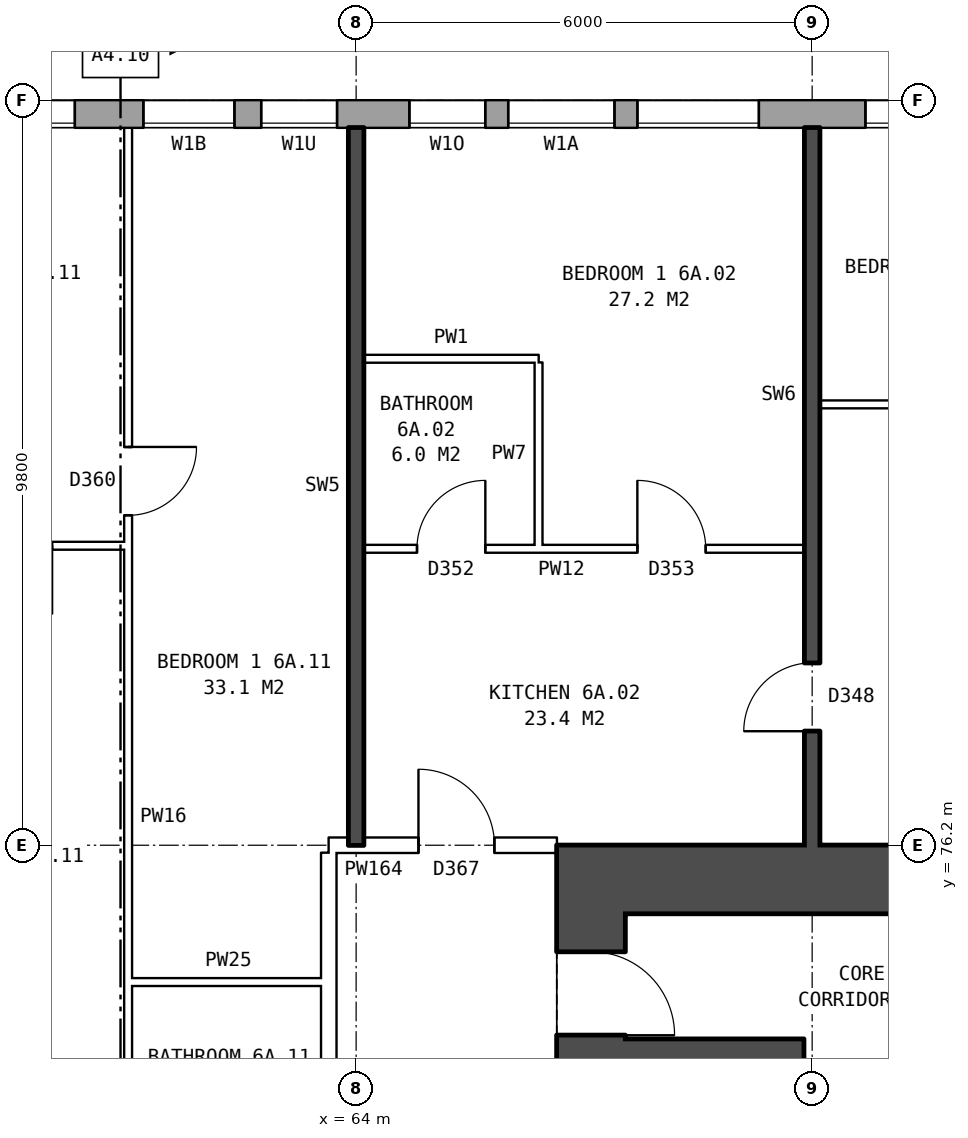
"""IFC4 building model, lengths in metres.
Left out: names, types, materials, properties, quantities, classifications, styles, units other than length and angle.
Written with IfcOpenShell. Run it as: python <this file> out.ifc"""

import sys

from ifc_helpers import new_model, si_unit, direction, frame, frame_2d, origin, place, context, subcontext, project, spatial, rectangle, extrude, element, fill, save


model = new_model("IFC4")
c1 = context("Model", 3, precision=1e-05, world=origin(), true_north=direction((0.0, 1.0)))
c2 = subcontext(c1, "Body", "Model", "MODEL_VIEW")
j1 = project(units=[si_unit("LENGTHUNIT", "METRE"), si_unit("PLANEANGLEUNIT", "RADIAN")], contexts=[c1])
p1 = place(None, origin())
s1 = spatial("IfcSite", under=j1, at=p1, CompositionType="ELEMENT")
p2 = place(p1, origin())
s2 = spatial("IfcBuilding", under=s1, at=p2, CompositionType="ELEMENT")
p3 = place(p2, frame((0.0, 0.0, 25.7)))
s3 = spatial("IfcBuildingStorey", under=s2, at=p3, CompositionType="ELEMENT", Elevation=25.7)
p4 = place(p3, frame((72.925, 85.82, 0.0), z_axis=(0.0, 0.0, 1.0), x_axis=(-1.0, 0.0, 0.0)))
e1 = element("IfcWall", 1, at=p4, inside=s3, PredefinedType="STANDARD", context=c2, shape_type="SweptSolid", body=[
    extrude(rectangle(XDim=50.101, YDim=0.36, at=frame_2d((25.05, 0.0))), origin(), (0.0, 0.0, 1.0), 2.85),
])
p5 = place(p4, frame((0.625, 0.0, 0.8)))
e2 = element("IfcOpeningElement", 2, at=p5, cuts=e1, PredefinedType="OPENING", context=c2, shape_type="SweptSolid", body=[
    extrude(rectangle(XDim=1.6, YDim=1.8, at=frame_2d((0.8, 0.9))), frame((0.0, 0.19, 0.0), z_axis=(0.0, -1.0, 0.0), x_axis=(1.0, 0.0, 0.0)), (0.0, 0.0, 1.0), 0.38),
])
p6 = place(p4, frame((3.625, 0.0, 0.8)))
e3 = element("IfcOpeningElement", 3, at=p6, cuts=e1, PredefinedType="OPENING", context=c2, shape_type="SweptSolid", body=[
    extrude(rectangle(XDim=1.6, YDim=1.8, at=frame_2d((0.8, 0.9))), frame((0.0, 0.19, 0.0), z_axis=(0.0, -1.0, 0.0), x_axis=(1.0, 0.0, 0.0)), (0.0, 0.0, 1.0), 0.38),
])
p7 = place(p4, frame((5.525, 0.0, 0.8)))
e4 = element("IfcOpeningElement", 4, at=p7, cuts=e1, PredefinedType="OPENING", context=c2, shape_type="SweptSolid", body=[
    extrude(rectangle(XDim=1.4, YDim=1.8, at=frame_2d((0.7, 0.9))), frame((0.0, 0.19, 0.0), z_axis=(0.0, -1.0, 0.0), x_axis=(1.0, 0.0, 0.0)), (0.0, 0.0, 1.0), 0.38),
])
p8 = place(p4, frame((9.175, 0.0, 0.15)))
e5 = element("IfcOpeningElement", 5, at=p8, cuts=e1, PredefinedType="OPENING", context=c2, shape_type="SweptSolid", body=[
    extrude(rectangle(XDim=1.0, YDim=0.9, at=frame_2d((0.5, 0.45))), frame((0.0, 0.19, 0.0), z_axis=(0.0, -1.0, 0.0), x_axis=(1.0, 0.0, 0.0)), (0.0, 0.0, 1.0), 0.38),
])
p9 = place(p4, frame((12.625, 0.0, 0.8)))
e6 = element("IfcOpeningElement", 6, at=p9, cuts=e1, PredefinedType="OPENING", context=c2, shape_type="SweptSolid", body=[
    extrude(rectangle(XDim=1.6, YDim=1.8, at=frame_2d((0.8, 0.9))), frame((0.0, 0.19, 0.0), z_axis=(0.0, -1.0, 0.0), x_axis=(1.0, 0.0, 0.0)), (0.0, 0.0, 1.0), 0.38),
])
p10 = place(p4, frame((15.625, 0.0, 0.8)))
e7 = element("IfcOpeningElement", 7, at=p10, cuts=e1, PredefinedType="OPENING", context=c2, shape_type="SweptSolid", body=[
    extrude(rectangle(XDim=1.6, YDim=1.8, at=frame_2d((0.8, 0.9))), frame((0.0, 0.19, 0.0), z_axis=(0.0, -1.0, 0.0), x_axis=(1.0, 0.0, 0.0)), (0.0, 0.0, 1.0), 0.38),
])
p11 = place(p4, frame((18.625, 0.0, 0.8)))
e8 = element("IfcOpeningElement", 8, at=p11, cuts=e1, PredefinedType="OPENING", context=c2, shape_type="SweptSolid", body=[
    extrude(rectangle(XDim=1.6, YDim=1.8, at=frame_2d((0.8, 0.9))), frame((0.0, 0.19, 0.0), z_axis=(0.0, -1.0, 0.0), x_axis=(1.0, 0.0, 0.0)), (0.0, 0.0, 1.0), 0.38),
])
p12 = place(p4, frame((21.625, 0.0, 0.8)))
e9 = element("IfcOpeningElement", 9, at=p12, cuts=e1, PredefinedType="OPENING", context=c2, shape_type="SweptSolid", body=[
    extrude(rectangle(XDim=1.6, YDim=1.8, at=frame_2d((0.8, 0.9))), frame((0.0, 0.19, 0.0), z_axis=(0.0, -1.0, 0.0), x_axis=(1.0, 0.0, 0.0)), (0.0, 0.0, 1.0), 0.38),
])
p13 = place(p4, frame((24.625, 0.0, 0.8)))
e10 = element("IfcOpeningElement", 10, at=p13, cuts=e1, PredefinedType="OPENING", context=c2, shape_type="SweptSolid", body=[
    extrude(rectangle(XDim=1.6, YDim=1.8, at=frame_2d((0.8, 0.9))), frame((0.0, 0.19, 0.0), z_axis=(0.0, -1.0, 0.0), x_axis=(1.0, 0.0, 0.0)), (0.0, 0.0, 1.0), 0.38),
])
p14 = place(p4, frame((27.625, 0.0, 0.8)))
e11 = element("IfcOpeningElement", 11, at=p14, cuts=e1, PredefinedType="OPENING", context=c2, shape_type="SweptSolid", body=[
    extrude(rectangle(XDim=1.6, YDim=1.8, at=frame_2d((0.8, 0.9))), frame((0.0, 0.19, 0.0), z_axis=(0.0, -1.0, 0.0), x_axis=(1.0, 0.0, 0.0)), (0.0, 0.0, 1.0), 0.38),
])
p15 = place(p4, frame((30.625, 0.0, 0.8)))
e12 = element("IfcOpeningElement", 12, at=p15, cuts=e1, PredefinedType="OPENING", context=c2, shape_type="SweptSolid", body=[
    extrude(rectangle(XDim=1.6, YDim=1.8, at=frame_2d((0.8, 0.9))), frame((0.0, 0.19, 0.0), z_axis=(0.0, -1.0, 0.0), x_axis=(1.0, 0.0, 0.0)), (0.0, 0.0, 1.0), 0.38),
])
p16 = place(p4, frame((33.625, 0.0, 0.8)))
e13 = element("IfcOpeningElement", 13, at=p16, cuts=e1, PredefinedType="OPENING", context=c2, shape_type="SweptSolid", body=[
    extrude(rectangle(XDim=1.6, YDim=1.8, at=frame_2d((0.8, 0.9))), frame((0.0, 0.19, 0.0), z_axis=(0.0, -1.0, 0.0), x_axis=(1.0, 0.0, 0.0)), (0.0, 0.0, 1.0), 0.38),
])
p17 = place(p4, frame((36.625, 0.0, 0.8)))
e14 = element("IfcOpeningElement", 14, at=p17, cuts=e1, PredefinedType="OPENING", context=c2, shape_type="SweptSolid", body=[
    extrude(rectangle(XDim=1.6, YDim=1.8, at=frame_2d((0.8, 0.9))), frame((0.0, 0.19, 0.0), z_axis=(0.0, -1.0, 0.0), x_axis=(1.0, 0.0, 0.0)), (0.0, 0.0, 1.0), 0.38),
])
p18 = place(p4, frame((39.125, 0.0, 0.8)))
e15 = element("IfcOpeningElement", 15, at=p18, cuts=e1, PredefinedType="OPENING", context=c2, shape_type="SweptSolid", body=[
    extrude(rectangle(XDim=0.8, YDim=0.9, at=frame_2d((0.4, 0.45))), frame((0.0, 0.19, 0.0), z_axis=(0.0, -1.0, 0.0), x_axis=(1.0, 0.0, 0.0)), (0.0, 0.0, 1.0), 0.38),
])
p19 = place(p4, frame((42.625, 0.0, 0.8)))
e16 = element("IfcOpeningElement", 16, at=p19, cuts=e1, PredefinedType="OPENING", context=c2, shape_type="SweptSolid", body=[
    extrude(rectangle(XDim=1.6, YDim=1.8, at=frame_2d((0.8, 0.9))), frame((0.0, 0.19, 0.0), z_axis=(0.0, -1.0, 0.0), x_axis=(1.0, 0.0, 0.0)), (0.0, 0.0, 1.0), 0.38),
])
p20 = place(p4, frame((45.625, 0.0, 0.8)))
e17 = element("IfcOpeningElement", 17, at=p20, cuts=e1, PredefinedType="OPENING", context=c2, shape_type="SweptSolid", body=[
    extrude(rectangle(XDim=1.6, YDim=1.8, at=frame_2d((0.8, 0.9))), frame((0.0, 0.19, 0.0), z_axis=(0.0, -1.0, 0.0), x_axis=(1.0, 0.0, 0.0)), (0.0, 0.0, 1.0), 0.38),
])
p21 = place(p4, frame((7.225, 0.0, 1.4)))
e18 = element("IfcOpeningElement", 18, at=p21, cuts=e1, PredefinedType="OPENING", context=c2, shape_type="SweptSolid", body=[
    extrude(rectangle(XDim=1.0, YDim=1.2, at=frame_2d((0.5, 0.6))), frame((0.0, 0.19, 0.0), z_axis=(0.0, -1.0, 0.0), x_axis=(1.0, 0.0, 0.0)), (0.0, 0.0, 1.0), 0.38),
])
p22 = place(p4, frame((10.525, 0.0, 0.15)))
e19 = element("IfcOpeningElement", 19, at=p22, cuts=e1, PredefinedType="OPENING", context=c2, shape_type="SweptSolid", body=[
    extrude(rectangle(XDim=1.2, YDim=1.8, at=frame_2d((0.6, 0.9))), frame((0.0, 0.19, 0.0), z_axis=(0.0, -1.0, 0.0), x_axis=(1.0, 0.0, 0.0)), (0.0, 0.0, 1.0), 0.38),
])
p23 = place(p4, frame((41.375, 0.0, 1.7)))
e20 = element("IfcOpeningElement", 20, at=p23, cuts=e1, PredefinedType="OPENING", context=c2, shape_type="SweptSolid", body=[
    extrude(rectangle(XDim=0.8, YDim=0.9, at=frame_2d((0.4, 0.45))), frame((0.0, 0.19, 0.0), z_axis=(0.0, -1.0, 0.0), x_axis=(1.0, 0.0, 0.0)), (0.0, 0.0, 1.0), 0.38),
])
p24 = place(p3, frame((67.09, 64.7, 0.0), z_axis=(0.0, 0.0, 1.0), x_axis=(0.0, 1.0, 0.0)))
e21 = element("IfcWall", 21, at=p24, inside=s3, PredefinedType="SHEAR", context=c2, shape_type="SweptSolid", body=[
    extrude(rectangle(XDim=10.6, YDim=0.9, at=frame_2d((5.3, 0.0))), origin(), (0.0, 0.0, 1.0), 2.85),
])
p25 = place(p24, frame((0.425, 0.0, 0.0)))
e22 = element("IfcOpeningElement", 22, at=p25, cuts=e21, PredefinedType="OPENING", context=c2, shape_type="SweptSolid", body=[
    extrude(rectangle(XDim=1.1, YDim=2.1, at=frame_2d((0.55, 1.05))), frame((0.0, 0.46, 0.0), z_axis=(0.0, -1.0, 0.0), x_axis=(1.0, 0.0, 0.0)), (0.0, 0.0, 1.0), 0.92),
])
p26 = place(p24, frame((9.0, 0.0, 0.0)))
e23 = element("IfcOpeningElement", 23, at=p26, cuts=e21, PredefinedType="OPENING", context=c2, shape_type="SweptSolid", body=[
    extrude(rectangle(XDim=1.1, YDim=2.1, at=frame_2d((0.55, 1.05))), frame((0.0, 0.46, 0.0), z_axis=(0.0, -1.0, 0.0), x_axis=(1.0, 0.0, 0.0)), (0.0, 0.0, 1.0), 0.92),
])
p27 = place(p3, frame((66.64, 75.75, 0.0), z_axis=(0.0, 0.0, 1.0), x_axis=(1.0, 0.0, 0.0)))
e24 = element("IfcWall", 24, at=p27, inside=s3, PredefinedType="SHEAR", context=c2, shape_type="SweptSolid", body=[
    extrude(rectangle(XDim=9.0, YDim=0.9, at=frame_2d((4.5, 0.0))), origin(), (0.0, 0.0, 1.0), 2.85),
])
p28 = place(p3, frame((67.54, 73.45, 0.0), z_axis=(0.0, 0.0, 1.0), x_axis=(1.0, 0.0, 0.0)))
e25 = element("IfcWall", 25, at=p28, inside=s3, PredefinedType="SHEAR", context=c2, shape_type="SweptSolid", body=[
    extrude(rectangle(XDim=1.95, YDim=0.4, at=frame_2d((0.975, 0.0))), origin(), (0.0, 0.0, 1.0), 2.85),
])
p29 = place(p3, frame((69.69, 67.05, 0.0), z_axis=(0.0, 0.0, 1.0), x_axis=(0.0, 1.0, 0.0)))
e26 = element("IfcWall", 26, at=p29, inside=s3, PredefinedType="SHEAR", context=c2, shape_type="SweptSolid", body=[
    extrude(rectangle(XDim=6.6, YDim=0.4, at=frame_2d((3.3, 0.0))), origin(), (0.0, 0.0, 1.0), 2.85),
])
p30 = place(p3, frame((63.64, 63.9, 0.0), z_axis=(0.0, 0.0, 1.0), x_axis=(0.0, 1.0, 0.0)))
e27 = element("IfcWall", 27, at=p30, inside=s3, PredefinedType="PARTITIONING", context=c2, shape_type="SweptSolid", body=[
    extrude(rectangle(XDim=12.2, YDim=0.2, at=frame_2d((6.1, 0.0))), origin(), (0.0, 0.0, 1.0), 2.85),
])
p31 = place(p30, frame((5.1, 0.0, 0.0)))
e28 = element("IfcOpeningElement", 28, at=p31, cuts=e27, PredefinedType="OPENING", context=c2, shape_type="SweptSolid", body=[
    extrude(rectangle(XDim=2.0, YDim=2.1, at=frame_2d((1.0, 1.05))), frame((0.0, 0.11, 0.0), z_axis=(0.0, -1.0, 0.0), x_axis=(1.0, 0.0, 0.0)), (0.0, 0.0, 1.0), 0.22),
])
p32 = place(p3, frame((61.0, 74.4, 0.0), z_axis=(0.0, 0.0, 1.0), x_axis=(1.0, 0.0, 0.0)))
e29 = element("IfcWall", 29, at=p32, inside=s3, PredefinedType="PARTITIONING", context=c2, shape_type="SweptSolid", body=[
    extrude(rectangle(XDim=2.64, YDim=0.1, at=frame_2d((1.32, 0.0))), origin(), (0.0, 0.0, 1.0), 2.85),
])
p33 = place(p3, frame((63.64, 76.2, 0.0), z_axis=(0.0, 0.0, 1.0), x_axis=(1.0, 0.0, 0.0)))
e30 = element("IfcWall", 30, at=p33, inside=s3, PredefinedType="PARTITIONING", context=c2, shape_type="SweptSolid", body=[
    extrude(rectangle(XDim=3.0, YDim=0.2, at=frame_2d((1.5, 0.0))), origin(), (0.0, 0.0, 1.0), 2.85),
])
p34 = place(p33, frame((1.18, 0.0, 0.0)))
e31 = element("IfcOpeningElement", 31, at=p34, cuts=e30, PredefinedType="OPENING", context=c2, shape_type="SweptSolid", body=[
    extrude(rectangle(XDim=1.0, YDim=2.1, at=frame_2d((0.5, 1.05))), frame((0.0, 0.11, 0.0), z_axis=(0.0, -1.0, 0.0), x_axis=(1.0, 0.0, 0.0)), (0.0, 0.0, 1.0), 0.22),
])
p35 = place(p3, frame((64.1, 80.1, 0.0), z_axis=(0.0, 0.0, 1.0), x_axis=(1.0, 0.0, 0.0)))
e32 = element("IfcWall", 32, at=p35, inside=s3, PredefinedType="PARTITIONING", context=c2, shape_type="SweptSolid", body=[
    extrude(rectangle(XDim=5.8, YDim=0.1, at=frame_2d((2.9, 0.0))), origin(), (0.0, 0.0, 1.0), 2.85),
])
p36 = place(p35, frame((3.6, 0.0, 0.0)))
e33 = element("IfcOpeningElement", 33, at=p36, cuts=e32, PredefinedType="OPENING", context=c2, shape_type="SweptSolid", body=[
    extrude(rectangle(XDim=0.9, YDim=2.1, at=frame_2d((0.45, 1.05))), frame((0.0, 0.06, 0.0), z_axis=(0.0, -1.0, 0.0), x_axis=(1.0, 0.0, 0.0)), (0.0, 0.0, 1.0), 0.12),
])
p37 = place(p35, frame((0.7, 0.0, 0.0)))
e34 = element("IfcOpeningElement", 34, at=p37, cuts=e32, PredefinedType="OPENING", context=c2, shape_type="SweptSolid", body=[
    extrude(rectangle(XDim=0.9, YDim=2.1, at=frame_2d((0.45, 1.05))), frame((0.0, 0.06, 0.0), z_axis=(0.0, -1.0, 0.0), x_axis=(1.0, 0.0, 0.0)), (0.0, 0.0, 1.0), 0.12),
])
p38 = place(p3, frame((58.1, 80.14, 0.0), z_axis=(0.0, 0.0, 1.0), x_axis=(1.0, 0.0, 0.0)))
e35 = element("IfcWall", 35, at=p38, inside=s3, PredefinedType="PARTITIONING", context=c2, shape_type="SweptSolid", body=[
    extrude(rectangle(XDim=2.9, YDim=0.1, at=frame_2d((1.45, 0.0))), origin(), (0.0, 0.0, 1.0), 2.85),
])
p39 = place(p38, frame((1.0, 0.0, 0.0)))
e36 = element("IfcOpeningElement", 36, at=p39, cuts=e35, PredefinedType="OPENING", context=c2, shape_type="SweptSolid", body=[
    extrude(rectangle(XDim=0.9, YDim=2.1, at=frame_2d((0.45, 1.05))), frame((0.0, 0.06, 0.0), z_axis=(0.0, -1.0, 0.0), x_axis=(1.0, 0.0, 0.0)), (0.0, 0.0, 1.0), 0.12),
])
p40 = place(p3, frame((70.1, 82.0, 0.0), z_axis=(0.0, 0.0, 1.0), x_axis=(1.0, 0.0, 0.0)))
e37 = element("IfcWall", 37, at=p40, inside=s3, PredefinedType="PARTITIONING", context=c2, shape_type="SweptSolid", body=[
    extrude(rectangle(XDim=5.54, YDim=0.1, at=frame_2d((2.77, 0.0))), origin(), (0.0, 0.0, 1.0), 2.85),
])
p41 = place(p40, frame((2.32, 0.0, 0.0)))
e38 = element("IfcOpeningElement", 38, at=p41, cuts=e37, PredefinedType="OPENING", context=c2, shape_type="SweptSolid", body=[
    extrude(rectangle(XDim=0.9, YDim=2.1, at=frame_2d((0.45, 1.05))), frame((0.0, 0.06, 0.0), z_axis=(0.0, -1.0, 0.0), x_axis=(1.0, 0.0, 0.0)), (0.0, 0.0, 1.0), 0.12),
])
p42 = place(p3, frame((64.1, 82.6, 0.0), z_axis=(0.0, 0.0, 1.0), x_axis=(1.0, 0.0, 0.0)))
e39 = element("IfcWall", 39, at=p42, inside=s3, PredefinedType="PARTITIONING", context=c2, shape_type="SweptSolid", body=[
    extrude(rectangle(XDim=2.3, YDim=0.1, at=frame_2d((1.15, 0.0))), origin(), (0.0, 0.0, 1.0), 2.85),
])
p43 = place(p3, frame((61.0, 71.3, 0.0), z_axis=(0.0, 0.0, 1.0), x_axis=(0.0, 1.0, 0.0)))
e40 = element("IfcWall", 40, at=p43, inside=s3, PredefinedType="PARTITIONING", context=c2, shape_type="SweptSolid", body=[
    extrude(rectangle(XDim=14.34, YDim=0.1, at=frame_2d((7.17, 0.0))), origin(), (0.0, 0.0, 1.0), 2.85),
])
p44 = place(p43, frame((9.24, 0.0, 0.0)))
e41 = element("IfcOpeningElement", 41, at=p44, cuts=e40, PredefinedType="OPENING", context=c2, shape_type="SweptSolid", body=[
    extrude(rectangle(XDim=0.9, YDim=2.1, at=frame_2d((0.45, 1.05))), frame((0.0, 0.06, 0.0), z_axis=(0.0, -1.0, 0.0), x_axis=(1.0, 0.0, 0.0)), (0.0, 0.0, 1.0), 0.12),
])
p45 = place(p43, frame((0.4, 0.0, 0.0)))
e42 = element("IfcOpeningElement", 42, at=p45, cuts=e40, PredefinedType="OPENING", context=c2, shape_type="SweptSolid", body=[
    extrude(rectangle(XDim=0.9, YDim=2.1, at=frame_2d((0.45, 1.05))), frame((0.0, 0.06, 0.0), z_axis=(0.0, -1.0, 0.0), x_axis=(1.0, 0.0, 0.0)), (0.0, 0.0, 1.0), 0.12),
])
p46 = place(p3, frame((64.0, 76.2, 0.0), z_axis=(0.0, 0.0, 1.0), x_axis=(0.0, 1.0, 0.0)))
e43 = element("IfcWall", 43, at=p46, inside=s3, PredefinedType="SOLIDWALL", context=c2, shape_type="SweptSolid", body=[
    extrude(rectangle(XDim=9.44, YDim=0.2, at=frame_2d((4.72, 0.0))), origin(), (0.0, 0.0, 1.0), 2.85),
])
p47 = place(p3, frame((66.4, 80.15, 0.0), z_axis=(0.0, 0.0, 1.0), x_axis=(0.0, 1.0, 0.0)))
e44 = element("IfcWall", 44, at=p47, inside=s3, PredefinedType="PARTITIONING", context=c2, shape_type="SweptSolid", body=[
    extrude(rectangle(XDim=2.4, YDim=0.1, at=frame_2d((1.2, 0.0))), origin(), (0.0, 0.0, 1.0), 2.85),
])
p48 = place(p3, frame((70.0, 76.2, 0.0), z_axis=(0.0, 0.0, 1.0), x_axis=(0.0, 1.0, 0.0)))
e45 = element("IfcWall", 45, at=p48, inside=s3, PredefinedType="SOLIDWALL", context=c2, shape_type="SweptSolid", body=[
    extrude(rectangle(XDim=9.44, YDim=0.2, at=frame_2d((4.72, 0.0))), origin(), (0.0, 0.0, 1.0), 2.85),
])
p49 = place(p48, frame((1.5, 0.0, 0.0)))
e46 = element("IfcOpeningElement", 46, at=p49, cuts=e45, PredefinedType="OPENING", context=c2, shape_type="SweptSolid", body=[
    extrude(rectangle(XDim=0.9, YDim=2.1, at=frame_2d((0.45, 1.05))), frame((0.0, 0.11, 0.0), z_axis=(0.0, -1.0, 0.0), x_axis=(1.0, 0.0, 0.0)), (0.0, 0.0, 1.0), 0.22),
])
p50 = place(p5, origin())
e47 = element("IfcWindow", 47, at=p50, inside=s3, PartitioningType="SINGLE_PANEL", PredefinedType="WINDOW", context=c2, shape_type="SweptSolid", body=[
    extrude(rectangle(XDim=1.6, YDim=1.8, at=frame_2d((0.8, 0.9))), frame((0.0, 0.15, 0.0), z_axis=(0.0, -1.0, 0.0), x_axis=(1.0, 0.0, 0.0)), (0.0, 0.0, 1.0), 0.06),
])
fill(e2, e47)
p51 = place(p6, origin())
e48 = element("IfcWindow", 48, at=p51, inside=s3, PartitioningType="SINGLE_PANEL", PredefinedType="WINDOW", context=c2, shape_type="SweptSolid", body=[
    extrude(rectangle(XDim=1.6, YDim=1.8, at=frame_2d((0.8, 0.9))), frame((0.0, 0.15, 0.0), z_axis=(0.0, -1.0, 0.0), x_axis=(1.0, 0.0, 0.0)), (0.0, 0.0, 1.0), 0.06),
])
fill(e3, e48)
p52 = place(p7, origin())
e49 = element("IfcWindow", 49, at=p52, inside=s3, PartitioningType="SINGLE_PANEL", PredefinedType="WINDOW", context=c2, shape_type="SweptSolid", body=[
    extrude(rectangle(XDim=1.4, YDim=1.8, at=frame_2d((0.7, 0.9))), frame((0.0, 0.15, 0.0), z_axis=(0.0, -1.0, 0.0), x_axis=(1.0, 0.0, 0.0)), (0.0, 0.0, 1.0), 0.06),
])
fill(e4, e49)
p53 = place(p8, origin())
e50 = element("IfcWindow", 50, at=p53, inside=s3, PartitioningType="SINGLE_PANEL", PredefinedType="WINDOW", context=c2, shape_type="SweptSolid", body=[
    extrude(rectangle(XDim=1.0, YDim=0.9, at=frame_2d((0.5, 0.45))), frame((0.0, 0.15, 0.0), z_axis=(0.0, -1.0, 0.0), x_axis=(1.0, 0.0, 0.0)), (0.0, 0.0, 1.0), 0.06),
])
fill(e5, e50)
p54 = place(p9, origin())
e51 = element("IfcWindow", 51, at=p54, inside=s3, PartitioningType="SINGLE_PANEL", PredefinedType="WINDOW", context=c2, shape_type="SweptSolid", body=[
    extrude(rectangle(XDim=1.6, YDim=1.8, at=frame_2d((0.8, 0.9))), frame((0.0, 0.15, 0.0), z_axis=(0.0, -1.0, 0.0), x_axis=(1.0, 0.0, 0.0)), (0.0, 0.0, 1.0), 0.06),
])
fill(e6, e51)
p55 = place(p26, frame((1.1, 0.0, 0.0), z_axis=(0.0, 0.0, 1.0), x_axis=(-1.0, 0.0, 0.0)))
e52 = element("IfcDoor", 52, at=p55, inside=s3, OperationType="SINGLE_SWING_RIGHT", PredefinedType="DOOR", context=c2, shape_type="SweptSolid", body=[
    extrude(rectangle(XDim=1.1, YDim=2.1, at=frame_2d((0.55, 1.05))), frame((0.0, 0.435, 0.0), z_axis=(0.0, -1.0, 0.0), x_axis=(1.0, 0.0, 0.0)), (0.0, 0.0, 1.0), 0.05),
])
fill(e23, e52)
p56 = place(p36, origin())
e53 = element("IfcDoor", 53, at=p56, inside=s3, OperationType="SINGLE_SWING_LEFT", PredefinedType="DOOR", context=c2, shape_type="SweptSolid", body=[
    extrude(rectangle(XDim=0.9, YDim=2.1, at=frame_2d((0.45, 1.05))), frame((0.0, 0.025, 0.0), z_axis=(0.0, -1.0, 0.0), x_axis=(1.0, 0.0, 0.0)), (0.0, 0.0, 1.0), 0.05),
])
fill(e33, e53)
p57 = place(p34, origin())
e54 = element("IfcDoor", 54, at=p57, inside=s3, OperationType="SINGLE_SWING_LEFT", PredefinedType="DOOR", context=c2, shape_type="SweptSolid", body=[
    extrude(rectangle(XDim=1.0, YDim=2.1, at=frame_2d((0.5, 1.05))), frame((0.0, 0.025, 0.0), z_axis=(0.0, -1.0, 0.0), x_axis=(1.0, 0.0, 0.0)), (0.0, 0.0, 1.0), 0.05),
])
fill(e31, e54)
p58 = place(p49, origin())
e55 = element("IfcDoor", 55, at=p58, inside=s3, OperationType="SINGLE_SWING_LEFT", PredefinedType="DOOR", context=c2, shape_type="SweptSolid", body=[
    extrude(rectangle(XDim=0.9, YDim=2.1, at=frame_2d((0.45, 1.05))), frame((0.0, 0.025, 0.0), z_axis=(0.0, -1.0, 0.0), x_axis=(1.0, 0.0, 0.0)), (0.0, 0.0, 1.0), 0.05),
])
fill(e46, e55)
p59 = place(p37, origin())
e56 = element("IfcDoor", 56, at=p59, inside=s3, OperationType="SINGLE_SWING_RIGHT", PredefinedType="DOOR", context=c2, shape_type="SweptSolid", body=[
    extrude(rectangle(XDim=0.9, YDim=2.1, at=frame_2d((0.45, 1.05))), frame((0.0, 0.025, 0.0), z_axis=(0.0, -1.0, 0.0), x_axis=(1.0, 0.0, 0.0)), (0.0, 0.0, 1.0), 0.05),
])
fill(e34, e56)
p60 = place(p44, frame((0.9, 0.0, 0.0), z_axis=(0.0, 0.0, 1.0), x_axis=(-1.0, 0.0, 0.0)))
e57 = element("IfcDoor", 57, at=p60, inside=s3, OperationType="SINGLE_SWING_LEFT", PredefinedType="DOOR", context=c2, shape_type="SweptSolid", body=[
    extrude(rectangle(XDim=0.9, YDim=2.1, at=frame_2d((0.45, 1.05))), frame((0.0, 0.025, 0.0), z_axis=(0.0, -1.0, 0.0), x_axis=(1.0, 0.0, 0.0)), (0.0, 0.0, 1.0), 0.05),
])
fill(e41, e57)
p61 = place(p21, origin())
e58 = element("IfcWindow", 58, at=p61, inside=s3, PartitioningType="SINGLE_PANEL", PredefinedType="WINDOW", context=c2, shape_type="SweptSolid", body=[
    extrude(rectangle(XDim=1.0, YDim=1.2, at=frame_2d((0.5, 0.6))), frame((0.0, 0.15, 0.0), z_axis=(0.0, -1.0, 0.0), x_axis=(1.0, 0.0, 0.0)), (0.0, 0.0, 1.0), 0.06),
])
fill(e18, e58)
p62 = place(p22, origin())
e59 = element("IfcWindow", 59, at=p62, inside=s3, PartitioningType="SINGLE_PANEL", PredefinedType="WINDOW", context=c2, shape_type="SweptSolid", body=[
    extrude(rectangle(XDim=1.2, YDim=1.8, at=frame_2d((0.6, 0.9))), frame((0.0, 0.15, 0.0), z_axis=(0.0, -1.0, 0.0), x_axis=(1.0, 0.0, 0.0)), (0.0, 0.0, 1.0), 0.06),
])
fill(e19, e59)
save(model, sys.argv[1])
